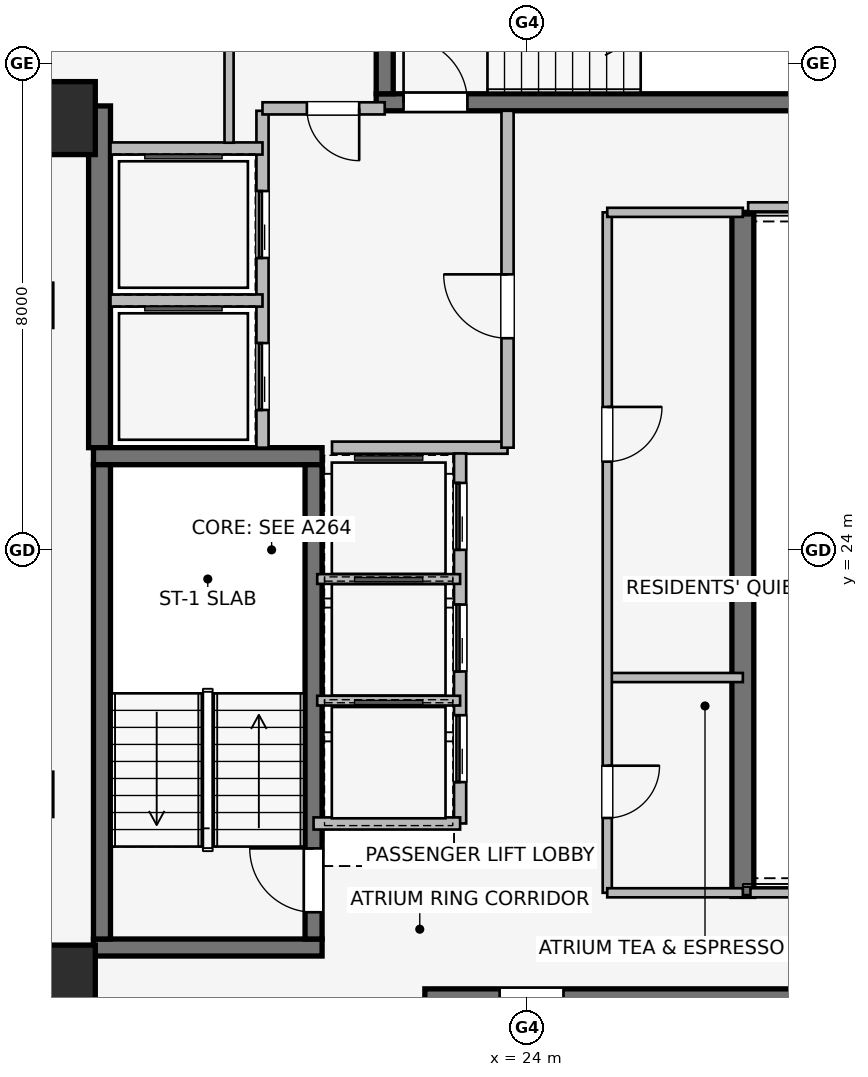
"""IFC4 building model, lengths in metres.
Left out: names, types, materials, properties, quantities, classifications, styles, units other than length and angle.
Written with IfcOpenShell. Run it as: python <this file> out.ifc"""

import sys

from ifc_helpers import new_model, si_unit, direction, frame, frame_2d, origin, origin_2d, place, context, subcontext, project, spatial, rectangle, extrude, element, fill, save


model = new_model("IFC4")
c1 = context("Model", 3, precision=1e-05, world=origin(), true_north=direction((0.0, 1.0)))
c2 = subcontext(c1, "Body", "Model", "MODEL_VIEW")
j1 = project(units=[si_unit("LENGTHUNIT", "METRE"), si_unit("PLANEANGLEUNIT", "RADIAN")], contexts=[c1])
p1 = place(None, origin())
s1 = spatial("IfcSite", under=j1, at=p1, CompositionType="ELEMENT")
p2 = place(p1, origin())
s2 = spatial("IfcBuilding", under=s1, at=p2, CompositionType="ELEMENT")
p3 = place(p2, frame((0.0, 0.0, 227.7)))
s3 = spatial("IfcBuildingStorey", under=s2, at=p3, CompositionType="ELEMENT", Elevation=227.7)
p4 = place(p3, frame((16.97, 25.68, 0.0), z_axis=(0.0, 0.0, 1.0), x_axis=(0.0, 1.0, 0.0)))
e1 = element("IfcWall", 1, at=p4, inside=s3, PredefinedType="SHEAR", context=c2, shape_type="SweptSolid", body=[
    extrude(rectangle(XDim=5.62, YDim=0.36, at=frame_2d((2.81, 0.0))), origin(), (0.0, 0.0, 1.0), 3.55),
])
p5 = place(p3, frame((27.55, 29.55, 0.0), z_axis=(0.0, 0.0, 1.0), x_axis=(0.0, -1.0, 0.0)))
e2 = element("IfcWall", 2, at=p5, inside=s3, PredefinedType="SHEAR", context=c2, shape_type="SweptSolid", body=[
    extrude(rectangle(XDim=11.25, YDim=0.36, at=frame_2d((5.625, 0.0))), origin(), (0.0, 0.0, 1.0), 3.55),
])
for number, where, z_axis, x_axis in (
    (3, (16.87, 17.46, 0.0), (0.0, 0.0, 1.0), (1.0, 0.0, 0.0)),
    (4, (20.63, 25.54, 0.0), (0.0, 0.0, 1.0), (-1.0, 0.0, 0.0)),
):
    element("IfcWall", number, at=place(p3, frame(where, z_axis=z_axis, x_axis=x_axis)), inside=s3, PredefinedType="SHEAR", context=c2, shape_type="SweptSolid", body=[
        extrude(rectangle(XDim=3.76, YDim=0.28, at=frame_2d((1.88, 0.0))), origin(), (0.0, 0.0, 1.0), 3.55),
    ])
p6 = place(p3, frame((17.01, 25.4, 0.0), z_axis=(0.0, 0.0, 1.0), x_axis=(0.0, -1.0, 0.0)))
e5 = element("IfcWall", 5, at=p6, inside=s3, PredefinedType="SHEAR", context=c2, shape_type="SweptSolid", body=[
    extrude(rectangle(XDim=7.8, YDim=0.28, at=frame_2d((3.9, 0.0))), origin(), (0.0, 0.0, 1.0), 3.55),
])
p7 = place(p3, frame((20.49, 17.6, 0.0), z_axis=(0.0, 0.0, 1.0), x_axis=(0.0, 1.0, 0.0)))
e6 = element("IfcWall", 6, at=p7, inside=s3, PredefinedType="SHEAR", context=c2, shape_type="SweptSolid", body=[
    extrude(rectangle(XDim=7.8, YDim=0.28, at=frame_2d((3.9, 0.0))), origin(), (0.0, 0.0, 1.0), 3.55),
])
p8 = place(p7, frame((0.44, 0.0, 0.0)))
e7 = element("IfcOpeningElement", 7, at=p8, cuts=e6, PredefinedType="OPENING", context=c2, shape_type="SweptSolid", body=[
    extrude(rectangle(XDim=1.05, YDim=2.0, at=frame_2d((0.525, 1.0))), frame((0.0, 0.15, 0.0), z_axis=(0.0, -1.0, 0.0), x_axis=(1.0, 0.0, 0.0)), (0.0, 0.0, 1.0), 0.3),
])
p9 = place(p3, frame((30.68, 16.64, 0.0), z_axis=(0.0, 0.0, 1.0), x_axis=(-1.0, 0.0, 0.0)))
e8 = element("IfcWall", 8, at=p9, inside=s3, PredefinedType="SHEAR", context=c2, shape_type="SweptSolid", body=[
    extrude(rectangle(XDim=8.36, YDim=0.28, at=frame_2d((4.18, 0.0))), origin(), (0.0, 0.0, 1.0), 3.55),
])
p10 = place(p9, frame((6.08, 0.0, 0.0)))
e9 = element("IfcOpeningElement", 9, at=p10, cuts=e8, PredefinedType="OPENING", context=c2, shape_type="SweptSolid", body=[
    extrude(rectangle(XDim=1.05, YDim=2.0, at=frame_2d((0.525, 1.0))), frame((0.0, 0.15, 0.0), z_axis=(0.0, -1.0, 0.0), x_axis=(1.0, 0.0, 0.0)), (0.0, 0.0, 1.0), 0.3),
])
p11 = place(p3, frame((21.52, 31.36, 0.0), z_axis=(0.0, 0.0, 1.0), x_axis=(1.0, 0.0, 0.0)))
e10 = element("IfcWall", 10, at=p11, inside=s3, PredefinedType="SHEAR", context=c2, shape_type="SweptSolid", body=[
    extrude(rectangle(XDim=8.36, YDim=0.28, at=frame_2d((4.18, 0.0))), origin(), (0.0, 0.0, 1.0), 3.55),
])
p12 = place(p11, frame((0.45, 0.0, 0.0)))
e11 = element("IfcOpeningElement", 11, at=p12, cuts=e10, PredefinedType="OPENING", context=c2, shape_type="SweptSolid", body=[
    extrude(rectangle(XDim=1.05, YDim=2.0, at=frame_2d((0.525, 1.0))), frame((0.0, 0.15, 0.0), z_axis=(0.0, -1.0, 0.0), x_axis=(1.0, 0.0, 0.0)), (0.0, 0.0, 1.0), 0.3),
])
p13 = place(p3, frame((21.66, 34.7, 0.0), z_axis=(0.0, 0.0, 1.0), x_axis=(0.0, -1.0, 0.0)))
e12 = element("IfcWall", 12, at=p13, inside=s3, PredefinedType="SHEAR", context=c2, shape_type="SweptSolid", body=[
    extrude(rectangle(XDim=3.2, YDim=0.28, at=frame_2d((1.6, 0.0))), origin(), (0.0, 0.0, 1.0), 3.55),
])
for number, where, z_axis, x_axis in (
    (13, (16.3, 16.9, 0.0), (0.0, 0.0, 1.0), (1.0, 0.0, 0.0)),
    (14, (16.3, 31.1, 0.0), (0.0, 0.0, 1.0), (1.0, 0.0, 0.0)),
):
    element("IfcColumn", number, at=place(p3, frame(where, z_axis=z_axis, x_axis=x_axis)), inside=s3, PredefinedType="COLUMN", context=c2, shape_type="SweptSolid", body=[
        extrude(rectangle(XDim=1.2, YDim=1.2, at=origin_2d()), origin(), (0.0, 0.0, 1.0), 3.55),
    ])
p14 = place(p3, frame((15.574, 32.082, 0.0), z_axis=(0.0, 0.0, 1.0), x_axis=(0.520325409202, 0.853968072318, 0.0)))
e15 = element("IfcWall", 15, at=p14, inside=s3, PredefinedType="STANDARD", context=c2, shape_type="SweptSolid", body=[
    extrude(rectangle(XDim=1.678, YDim=0.33, at=frame_2d((0.839, 0.0))), origin(), (0.0, 0.0, 1.0), 3.29),
])
p15 = place(p3, frame((19.65, 25.68, 0.0), z_axis=(0.0, 0.0, 1.0), x_axis=(0.0, 1.0, 0.0)))
e16 = element("IfcWall", 16, at=p15, inside=s3, PredefinedType="PARTITIONING", context=c2, shape_type="SweptSolid", body=[
    extrude(rectangle(XDim=5.54, YDim=0.2, at=frame_2d((2.77, 0.0))), origin(), (0.0, 0.0, 1.0), 3.29),
])
p16 = place(p15, frame((0.62, 0.0, 0.0)))
e17 = element("IfcOpeningElement", 17, at=p16, cuts=e16, PredefinedType="OPENING", context=c2, shape_type="SweptSolid", body=[
    extrude(rectangle(XDim=1.1, YDim=2.2, at=frame_2d((0.55, 1.1))), frame((0.0, 0.11, 0.0), z_axis=(0.0, -1.0, 0.0), x_axis=(1.0, 0.0, 0.0)), (0.0, 0.0, 1.0), 0.22),
])
p17 = place(p15, frame((3.12, 0.0, 0.0)))
e18 = element("IfcOpeningElement", 18, at=p17, cuts=e16, PredefinedType="OPENING", context=c2, shape_type="SweptSolid", body=[
    extrude(rectangle(XDim=1.1, YDim=2.2, at=frame_2d((0.55, 1.1))), frame((0.0, 0.11, 0.0), z_axis=(0.0, -1.0, 0.0), x_axis=(1.0, 0.0, 0.0)), (0.0, 0.0, 1.0), 0.22),
])
p18 = place(p3, frame((20.793, 25.68, 0.0), z_axis=(0.0, 0.0, 1.0), x_axis=(1.0, 0.0, 0.0)))
e19 = element("IfcWall", 19, at=p18, inside=s3, PredefinedType="PARTITIONING", context=c2, shape_type="SweptSolid", body=[
    extrude(rectangle(XDim=2.887, YDim=0.2, at=frame_2d((1.443, 0.0))), origin(), (0.0, 0.0, 1.0), 3.29),
])
p19 = place(p3, frame((23.68, 25.68, 0.0), z_axis=(0.0, 0.0, 1.0), x_axis=(0.0, 1.0, 0.0)))
e20 = element("IfcWall", 20, at=p19, inside=s3, PredefinedType="PARTITIONING", context=c2, shape_type="SweptSolid", body=[
    extrude(rectangle(XDim=5.54, YDim=0.2, at=frame_2d((2.77, 0.0))), origin(), (0.0, 0.0, 1.0), 3.29),
])
p20 = place(p19, frame((1.8, 0.0, 0.0)))
e21 = element("IfcOpeningElement", 21, at=p20, cuts=e20, PredefinedType="OPENING", context=c2, shape_type="SweptSolid", body=[
    extrude(rectangle(XDim=1.05, YDim=2.0, at=frame_2d((0.525, 1.0))), frame((0.0, 0.11, 0.0), z_axis=(0.0, -1.0, 0.0), x_axis=(1.0, 0.0, 0.0)), (0.0, 0.0, 1.0), 0.22),
])
p21 = place(p3, frame((21.66, 31.26, 0.0), z_axis=(0.0, 0.0, 1.0), x_axis=(-1.0, 0.0, 0.0)))
e22 = element("IfcWall", 22, at=p21, inside=s3, PredefinedType="PARTITIONING", context=c2, shape_type="SweptSolid", body=[
    extrude(rectangle(XDim=2.01, YDim=0.2, at=frame_2d((1.005, 0.0))), origin(), (0.0, 0.0, 1.0), 3.29),
])
p22 = place(p21, frame((0.42, 0.0, 0.0)))
e23 = element("IfcOpeningElement", 23, at=p22, cuts=e22, PredefinedType="OPENING", context=c2, shape_type="SweptSolid", body=[
    extrude(rectangle(XDim=0.86, YDim=2.0, at=frame_2d((0.43, 1.0))), frame((0.0, 0.11, 0.0), z_axis=(0.0, -1.0, 0.0), x_axis=(1.0, 0.0, 0.0)), (0.0, 0.0, 1.0), 0.22),
])
p23 = place(p3, frame((17.15, 28.1, 0.0), z_axis=(0.0, 0.0, 1.0), x_axis=(1.0, 0.0, 0.0)))
e24 = element("IfcWall", 24, at=p23, inside=s3, PredefinedType="PARTITIONING", context=c2, shape_type="SweptSolid", body=[
    extrude(rectangle(XDim=2.5, YDim=0.2, at=frame_2d((1.25, 0.0))), origin(), (0.0, 0.0, 1.0), 3.29),
])
p24 = place(p3, frame((19.65, 30.6, 0.0), z_axis=(0.0, 0.0, 1.0), x_axis=(-1.0, 0.0, 0.0)))
e25 = element("IfcWall", 25, at=p24, inside=s3, PredefinedType="PARTITIONING", context=c2, shape_type="SweptSolid", body=[
    extrude(rectangle(XDim=2.5, YDim=0.2, at=frame_2d((1.25, 0.0))), origin(), (0.0, 0.0, 1.0), 2.19),
])
p25 = place(p3, frame((22.9, 19.5, 0.0), z_axis=(0.0, 0.0, 1.0), x_axis=(0.0, 1.0, 0.0)))
e26 = element("IfcWall", 26, at=p25, inside=s3, PredefinedType="PARTITIONING", context=c2, shape_type="SweptSolid", body=[
    extrude(rectangle(XDim=6.085, YDim=0.2, at=frame_2d((3.042, 0.0))), origin(), (0.0, 0.0, 1.0), 3.29),
])
p26 = place(p25, frame((0.68, 0.0, 0.0)))
e27 = element("IfcOpeningElement", 27, at=p26, cuts=e26, PredefinedType="OPENING", context=c2, shape_type="SweptSolid", body=[
    extrude(rectangle(XDim=1.1, YDim=2.2, at=frame_2d((0.55, 1.1))), frame((0.0, 0.11, 0.0), z_axis=(0.0, -1.0, 0.0), x_axis=(1.0, 0.0, 0.0)), (0.0, 0.0, 1.0), 0.22),
])
p27 = place(p25, frame((2.5, 0.0, 0.0)))
e28 = element("IfcOpeningElement", 28, at=p27, cuts=e26, PredefinedType="OPENING", context=c2, shape_type="SweptSolid", body=[
    extrude(rectangle(XDim=1.1, YDim=2.2, at=frame_2d((0.55, 1.1))), frame((0.0, 0.11, 0.0), z_axis=(0.0, -1.0, 0.0), x_axis=(1.0, 0.0, 0.0)), (0.0, 0.0, 1.0), 0.22),
])
p28 = place(p25, frame((4.5, 0.0, 0.0)))
e29 = element("IfcOpeningElement", 29, at=p28, cuts=e26, PredefinedType="OPENING", context=c2, shape_type="SweptSolid", body=[
    extrude(rectangle(XDim=1.1, YDim=2.2, at=frame_2d((0.55, 1.1))), frame((0.0, 0.11, 0.0), z_axis=(0.0, -1.0, 0.0), x_axis=(1.0, 0.0, 0.0)), (0.0, 0.0, 1.0), 0.22),
])
p29 = place(p3, frame((20.49, 19.5, 0.0), z_axis=(0.0, 0.0, 1.0), x_axis=(1.0, 0.0, 0.0)))
e30 = element("IfcWall", 30, at=p29, inside=s3, PredefinedType="PARTITIONING", context=c2, shape_type="SweptSolid", body=[
    extrude(rectangle(XDim=2.41, YDim=0.2, at=frame_2d((1.205, 0.0))), origin(), (0.0, 0.0, 1.0), 2.19),
])
for number, where, z_axis, x_axis in (
    (31, (20.55, 21.52, 0.0), (0.0, 0.0, 1.0), (1.0, 0.0, 0.0)),
    (32, (20.55, 23.52, 0.0), (0.0, 0.0, 1.0), (1.0, 0.0, 0.0)),
):
    element("IfcWall", number, at=place(p3, frame(where, z_axis=z_axis, x_axis=x_axis)), inside=s3, PredefinedType="PARTITIONING", context=c2, shape_type="SweptSolid", body=[
        extrude(rectangle(XDim=2.35, YDim=0.16, at=frame_2d((1.175, 0.0))), origin(), (0.0, 0.0, 1.0), 3.29),
    ])
p30 = place(p3, frame((25.32, 21.9, 0.0), z_axis=(0.0, 0.0, 1.0), x_axis=(1.0, 0.0, 0.0)))
e33 = element("IfcWall", 33, at=p30, inside=s3, PredefinedType="PARTITIONING", context=c2, shape_type="SweptSolid", body=[
    extrude(rectangle(XDim=2.23, YDim=0.15, at=frame_2d((1.115, 0.0))), origin(), (0.0, 0.0, 1.0), 3.29),
])
p31 = place(p3, frame((25.32, 29.55, 0.0), z_axis=(0.0, 0.0, 1.0), x_axis=(0.0, -1.0, 0.0)))
e34 = element("IfcWall", 34, at=p31, inside=s3, PredefinedType="PARTITIONING", context=c2, shape_type="SweptSolid", body=[
    extrude(rectangle(XDim=11.19, YDim=0.15, at=frame_2d((5.595, 0.0))), origin(), (0.0, 0.0, 1.0), 3.29),
])
p32 = place(p31, frame((3.2, 0.0, 0.0)))
e35 = element("IfcOpeningElement", 35, at=p32, cuts=e34, PredefinedType="OPENING", context=c2, shape_type="SweptSolid", body=[
    extrude(rectangle(XDim=0.9, YDim=2.0, at=frame_2d((0.45, 1.0))), frame((0.0, 0.085, 0.0), z_axis=(0.0, -1.0, 0.0), x_axis=(1.0, 0.0, 0.0)), (0.0, 0.0, 1.0), 0.17),
])
p33 = place(p31, frame((9.1, 0.0, 0.0)))
e36 = element("IfcOpeningElement", 36, at=p33, cuts=e34, PredefinedType="OPENING", context=c2, shape_type="SweptSolid", body=[
    extrude(rectangle(XDim=0.86, YDim=2.0, at=frame_2d((0.43, 1.0))), frame((0.0, 0.085, 0.0), z_axis=(0.0, -1.0, 0.0), x_axis=(1.0, 0.0, 0.0)), (0.0, 0.0, 1.0), 0.17),
])
p34 = place(p3, frame((25.32, 18.36, 0.0), z_axis=(0.0, 0.0, 1.0), x_axis=(1.0, 0.0, 0.0)))
e37 = element("IfcWall", 37, at=p34, inside=s3, PredefinedType="PARTITIONING", context=c2, shape_type="SweptSolid", body=[
    extrude(rectangle(XDim=2.23, YDim=0.15, at=frame_2d((1.115, 0.0))), origin(), (0.0, 0.0, 1.0), 3.29),
])
p35 = place(p3, frame((27.55, 29.55, 0.0), z_axis=(0.0, 0.0, 1.0), x_axis=(-1.0, 0.0, 0.0)))
e38 = element("IfcWall", 38, at=p35, inside=s3, PredefinedType="PARTITIONING", context=c2, shape_type="SweptSolid", body=[
    extrude(rectangle(XDim=2.23, YDim=0.15, at=frame_2d((1.115, 0.0))), origin(), (0.0, 0.0, 1.0), 2.19),
])
p36 = place(p3, frame((19.1, 33.35, 0.0), z_axis=(0.0, 0.0, 1.0), x_axis=(0.0, -1.0, 0.0)))
e39 = element("IfcWall", 39, at=p36, inside=s3, PredefinedType="PARTITIONING", context=c2, shape_type="SweptSolid", body=[
    extrude(rectangle(XDim=2.655, YDim=0.15, at=frame_2d((1.328, 0.0))), origin(), (0.0, 0.0, 1.0), 3.29),
])
p37 = place(p3, frame((27.675, 18.36, 0.0), z_axis=(0.0, 0.0, 1.0), x_axis=(1.0, 0.0, 0.0)))
e40 = element("IfcWall", 40, at=p37, inside=s3, PredefinedType="PARTITIONING", context=c2, shape_type="SweptSolid", body=[
    extrude(rectangle(XDim=12.165, YDim=0.15, at=frame_2d((6.083, 0.0))), origin(), (0.0, 0.0, 1.0), 2.431),
])
p38 = place(p3, frame((39.84, 29.64, 0.0), z_axis=(0.0, 0.0, 1.0), x_axis=(-1.0, 0.0, 0.0)))
e41 = element("IfcWall", 41, at=p38, inside=s3, PredefinedType="PARTITIONING", context=c2, shape_type="SweptSolid", body=[
    extrude(rectangle(XDim=12.203, YDim=0.15, at=frame_2d((6.102, 0.0))), origin(), (0.0, 0.0, 1.0), 2.431),
])
p39 = place(p8, origin())
e42 = element("IfcDoor", 42, at=p39, inside=s3, OperationType="SINGLE_SWING_RIGHT", PredefinedType="DOOR", context=c2, shape_type="SweptSolid", body=[
    extrude(rectangle(XDim=1.05, YDim=2.0, at=frame_2d((0.525, 1.0))), frame((0.0, 0.025, 0.0), z_axis=(0.0, -1.0, 0.0), x_axis=(1.0, 0.0, 0.0)), (0.0, 0.0, 1.0), 0.05),
])
fill(e7, e42)
p40 = place(p10, origin())
e43 = element("IfcDoor", 43, at=p40, inside=s3, OperationType="SINGLE_SWING_RIGHT", PredefinedType="DOOR", context=c2, shape_type="SweptSolid", body=[
    extrude(rectangle(XDim=1.05, YDim=2.0, at=frame_2d((0.525, 1.0))), frame((0.0, 0.025, 0.0), z_axis=(0.0, -1.0, 0.0), x_axis=(1.0, 0.0, 0.0)), (0.0, 0.0, 1.0), 0.05),
])
fill(e9, e43)
p41 = place(p12, origin())
e44 = element("IfcDoor", 44, at=p41, inside=s3, OperationType="SINGLE_SWING_LEFT", PredefinedType="DOOR", context=c2, shape_type="SweptSolid", body=[
    extrude(rectangle(XDim=1.05, YDim=2.0, at=frame_2d((0.525, 1.0))), frame((0.0, 0.025, 0.0), z_axis=(0.0, -1.0, 0.0), x_axis=(1.0, 0.0, 0.0)), (0.0, 0.0, 1.0), 0.05),
])
fill(e11, e44)
p42 = place(p16, origin())
e45 = element("IfcDoor", 45, at=p42, inside=s3, OperationType="SLIDING_TO_LEFT", PredefinedType="DOOR", context=c2, shape_type="SweptSolid", body=[
    extrude(rectangle(XDim=1.1, YDim=2.2, at=frame_2d((0.55, 1.1))), frame((0.0, 0.025, 0.0), z_axis=(0.0, -1.0, 0.0), x_axis=(1.0, 0.0, 0.0)), (0.0, 0.0, 1.0), 0.05),
])
fill(e17, e45)
p43 = place(p17, origin())
e46 = element("IfcDoor", 46, at=p43, inside=s3, OperationType="SLIDING_TO_LEFT", PredefinedType="DOOR", context=c2, shape_type="SweptSolid", body=[
    extrude(rectangle(XDim=1.1, YDim=2.2, at=frame_2d((0.55, 1.1))), frame((0.0, 0.025, 0.0), z_axis=(0.0, -1.0, 0.0), x_axis=(1.0, 0.0, 0.0)), (0.0, 0.0, 1.0), 0.05),
])
fill(e18, e46)
p44 = place(p20, origin())
e47 = element("IfcDoor", 47, at=p44, inside=s3, OperationType="SINGLE_SWING_RIGHT", PredefinedType="DOOR", context=c2, shape_type="SweptSolid", body=[
    extrude(rectangle(XDim=1.05, YDim=2.0, at=frame_2d((0.525, 1.0))), frame((0.0, 0.025, 0.0), z_axis=(0.0, -1.0, 0.0), x_axis=(1.0, 0.0, 0.0)), (0.0, 0.0, 1.0), 0.05),
])
fill(e21, e47)
p45 = place(p22, origin())
e48 = element("IfcDoor", 48, at=p45, inside=s3, OperationType="SINGLE_SWING_LEFT", PredefinedType="DOOR", context=c2, shape_type="SweptSolid", body=[
    extrude(rectangle(XDim=0.86, YDim=2.0, at=frame_2d((0.43, 1.0))), frame((0.0, 0.025, 0.0), z_axis=(0.0, -1.0, 0.0), x_axis=(1.0, 0.0, 0.0)), (0.0, 0.0, 1.0), 0.05),
])
fill(e23, e48)
p46 = place(p26, origin())
e49 = element("IfcDoor", 49, at=p46, inside=s3, OperationType="SLIDING_TO_LEFT", PredefinedType="DOOR", context=c2, shape_type="SweptSolid", body=[
    extrude(rectangle(XDim=1.1, YDim=2.2, at=frame_2d((0.55, 1.1))), frame((0.0, 0.025, 0.0), z_axis=(0.0, -1.0, 0.0), x_axis=(1.0, 0.0, 0.0)), (0.0, 0.0, 1.0), 0.05),
])
fill(e27, e49)
p47 = place(p27, origin())
e50 = element("IfcDoor", 50, at=p47, inside=s3, OperationType="SLIDING_TO_LEFT", PredefinedType="DOOR", context=c2, shape_type="SweptSolid", body=[
    extrude(rectangle(XDim=1.1, YDim=2.2, at=frame_2d((0.55, 1.1))), frame((0.0, 0.025, 0.0), z_axis=(0.0, -1.0, 0.0), x_axis=(1.0, 0.0, 0.0)), (0.0, 0.0, 1.0), 0.05),
])
fill(e28, e50)
p48 = place(p28, origin())
e51 = element("IfcDoor", 51, at=p48, inside=s3, OperationType="SLIDING_TO_LEFT", PredefinedType="DOOR", context=c2, shape_type="SweptSolid", body=[
    extrude(rectangle(XDim=1.1, YDim=2.2, at=frame_2d((0.55, 1.1))), frame((0.0, 0.025, 0.0), z_axis=(0.0, -1.0, 0.0), x_axis=(1.0, 0.0, 0.0)), (0.0, 0.0, 1.0), 0.05),
])
fill(e29, e51)
p49 = place(p32, origin())
e52 = element("IfcDoor", 52, at=p49, inside=s3, OperationType="SINGLE_SWING_LEFT", PredefinedType="DOOR", context=c2, shape_type="SweptSolid", body=[
    extrude(rectangle(XDim=0.9, YDim=2.0, at=frame_2d((0.45, 1.0))), frame((0.0, 0.025, 0.0), z_axis=(0.0, -1.0, 0.0), x_axis=(1.0, 0.0, 0.0)), (0.0, 0.0, 1.0), 0.05),
])
fill(e35, e52)
p50 = place(p33, origin())
e53 = element("IfcDoor", 53, at=p50, inside=s3, OperationType="SINGLE_SWING_LEFT", PredefinedType="DOOR", context=c2, shape_type="SweptSolid", body=[
    extrude(rectangle(XDim=0.86, YDim=2.0, at=frame_2d((0.43, 1.0))), frame((0.0, 0.025, 0.0), z_axis=(0.0, -1.0, 0.0), x_axis=(1.0, 0.0, 0.0)), (0.0, 0.0, 1.0), 0.05),
])
fill(e36, e53)
save(model, sys.argv[1])
